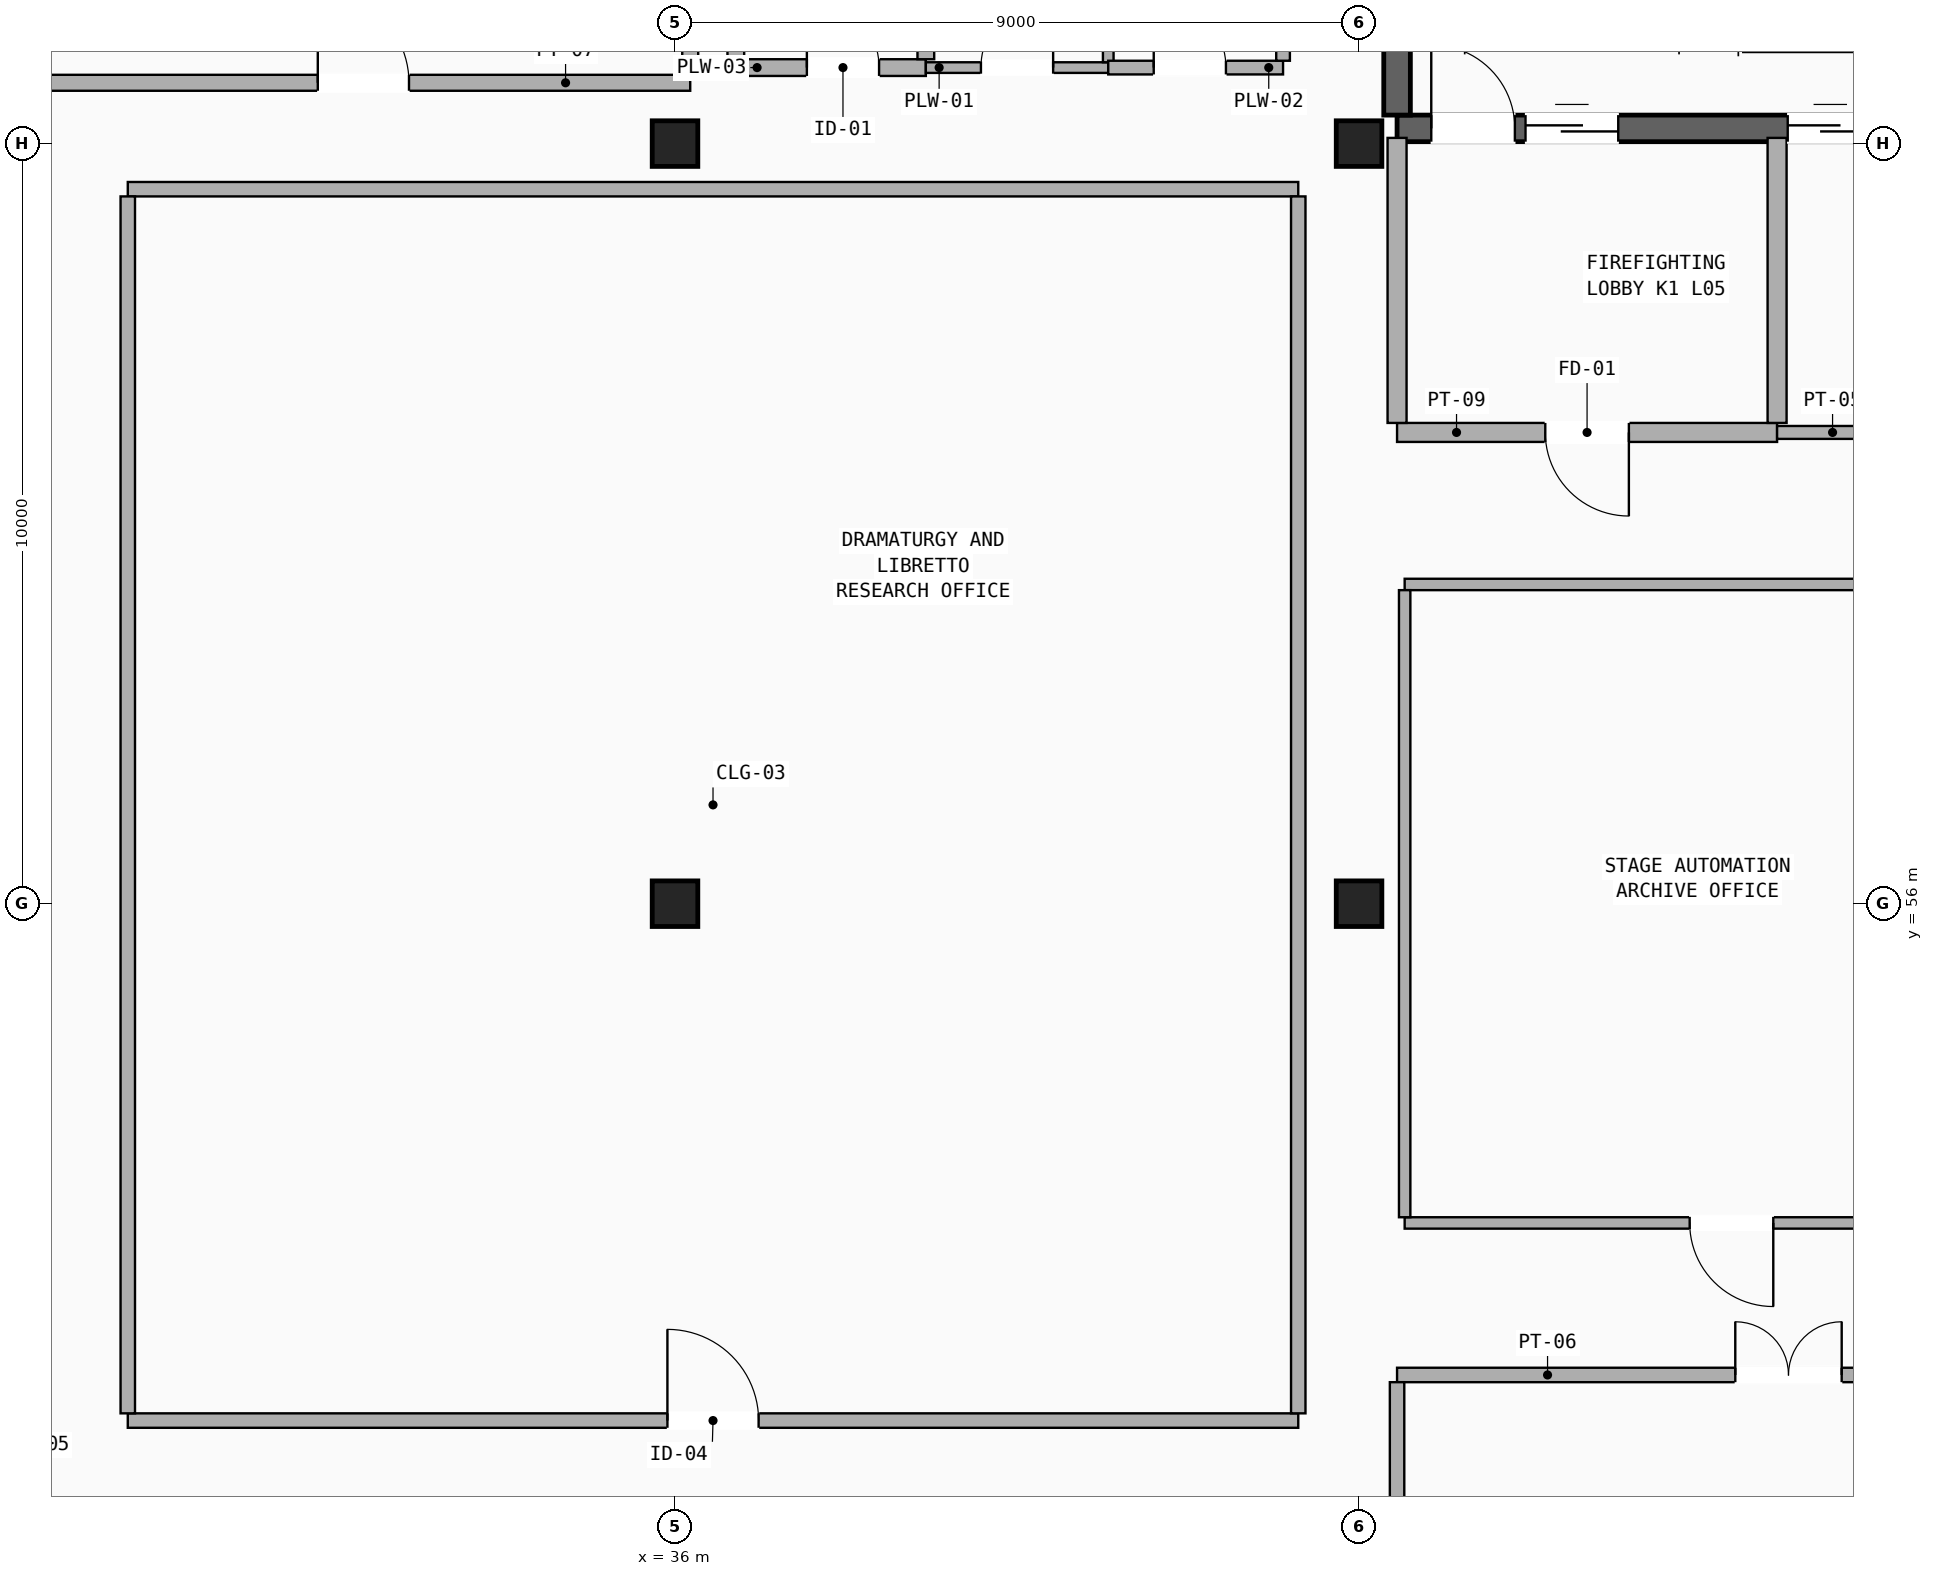
"""IFC4 building model, lengths in metres.
Left out: names, types, materials, properties, quantities, classifications, styles, units other than length and angle.
Written with IfcOpenShell. Run it as: python <this file> out.ifc"""

import sys

from ifc_helpers import new_model, si_unit, direction, frame, frame_2d, origin, origin_2d, place, context, subcontext, project, spatial, rectangle, extrude, element, fill, save


model = new_model("IFC4")
c1 = context("Model", 3, precision=1e-05, world=origin(), true_north=direction((0.0, 1.0)))
c2 = subcontext(c1, "Body", "Model", "MODEL_VIEW")
j1 = project(units=[si_unit("LENGTHUNIT", "METRE"), si_unit("PLANEANGLEUNIT", "RADIAN")], contexts=[c1])
p1 = place(None, origin())
s1 = spatial("IfcSite", under=j1, at=p1, CompositionType="ELEMENT")
p2 = place(p1, origin())
s2 = spatial("IfcBuilding", under=s1, at=p2, CompositionType="ELEMENT")
p3 = place(p2, frame((0.0, 0.0, 21.76)))
s3 = spatial("IfcBuildingStorey", under=s2, at=p3, CompositionType="ELEMENT", Elevation=21.76)
p4 = place(p3, frame((36.0, 56.0, 0.0), z_axis=(0.0, 0.0, 1.0), x_axis=(1.0, 0.0, 0.0)))
e1 = element("IfcColumn", 1, at=p4, inside=s3, PredefinedType="COLUMN", context=c2, shape_type="SweptSolid", body=[
    extrude(rectangle(XDim=0.6, YDim=0.6, at=origin_2d()), origin(), (0.0, 0.0, 1.0), 3.25),
])
p5 = place(p3, frame((36.0, 66.0, 0.0), z_axis=(0.0, 0.0, 1.0), x_axis=(1.0, 0.0, 0.0)))
e2 = element("IfcColumn", 2, at=p5, inside=s3, PredefinedType="COLUMN", context=c2, shape_type="SweptSolid", body=[
    extrude(rectangle(XDim=0.6, YDim=0.6, at=origin_2d()), origin(), (0.0, 0.0, 1.0), 7.987),
])
p6 = place(p3, frame((45.0, 56.0, 0.0), z_axis=(0.0, 0.0, 1.0), x_axis=(1.0, 0.0, 0.0)))
e3 = element("IfcColumn", 3, at=p6, inside=s3, PredefinedType="COLUMN", context=c2, shape_type="SweptSolid", body=[
    extrude(rectangle(XDim=0.6, YDim=0.6, at=origin_2d()), origin(), (0.0, 0.0, 1.0), 3.25),
])
p7 = place(p3, frame((45.0, 66.0, 0.0), z_axis=(0.0, 0.0, 1.0), x_axis=(1.0, 0.0, 0.0)))
e4 = element("IfcColumn", 4, at=p7, inside=s3, PredefinedType="COLUMN", context=c2, shape_type="SweptSolid", body=[
    extrude(rectangle(XDim=0.6, YDim=0.6, at=origin_2d()), origin(), (0.0, 0.0, 1.0), 7.987),
])
p8 = place(p3, frame((45.5, 66.2, 0.0), z_axis=(0.0, 0.0, 1.0), x_axis=(1.0, 0.0, 0.0)))
e5 = element("IfcWall", 5, at=p8, inside=s3, PredefinedType="SHEAR", context=c2, shape_type="SweptSolid", body=[
    extrude(rectangle(XDim=10.3, YDim=0.35, at=frame_2d((5.15, 0.0))), origin(), (0.0, 0.0, 1.0), 8.312),
])
p9 = place(p8, frame((0.45, 0.0, 0.0)))
e6 = element("IfcOpeningElement", 6, at=p9, cuts=e5, PredefinedType="OPENING", context=c2, shape_type="SweptSolid", body=[
    extrude(rectangle(XDim=1.1, YDim=2.2, at=frame_2d((0.55, 1.1))), frame((0.0, 0.185, 0.0), z_axis=(0.0, -1.0, 0.0), x_axis=(1.0, 0.0, 0.0)), (0.0, 0.0, 1.0), 0.37),
])
p10 = place(p8, frame((1.69, 0.0, 0.0)))
e7 = element("IfcOpeningElement", 7, at=p10, cuts=e5, PredefinedType="OPENING", context=c2, shape_type="SweptSolid", body=[
    extrude(rectangle(XDim=1.22, YDim=2.2, at=frame_2d((0.61, 1.1))), frame((0.0, 0.185, 0.0), z_axis=(0.0, -1.0, 0.0), x_axis=(1.0, 0.0, 0.0)), (0.0, 0.0, 1.0), 0.37),
])
p11 = place(p8, frame((5.14, 0.0, 0.0)))
e8 = element("IfcOpeningElement", 8, at=p11, cuts=e5, PredefinedType="OPENING", context=c2, shape_type="SweptSolid", body=[
    extrude(rectangle(XDim=1.12, YDim=2.16, at=frame_2d((0.56, 1.08))), frame((0.0, 0.185, 0.0), z_axis=(0.0, -1.0, 0.0), x_axis=(1.0, 0.0, 0.0)), (0.0, 0.0, 1.0), 0.37),
])
p12 = place(p3, frame((45.5, 66.375, 0.0), z_axis=(0.0, 0.0, 1.0), x_axis=(0.0, 1.0, 0.0)))
e9 = element("IfcWall", 9, at=p12, inside=s3, PredefinedType="SHEAR", context=c2, shape_type="SweptSolid", body=[
    extrude(rectangle(XDim=8.25, YDim=0.35, at=frame_2d((4.125, 0.0))), origin(), (0.0, 0.0, 1.0), 8.312),
])
p13 = place(p3, frame((45.5, 62.2, 0.0), z_axis=(0.0, 0.0, 1.0), x_axis=(1.0, 0.0, 0.0)))
e10 = element("IfcWall", 10, at=p13, inside=s3, PredefinedType="PARTITIONING", context=c2, shape_type="SweptSolid", body=[
    extrude(rectangle(XDim=5.0, YDim=0.25, at=frame_2d((2.5, 0.0))), origin(), (0.0, 0.0, 1.0), 6.247),
])
p14 = place(p13, frame((1.95, 0.0, 0.0)))
e11 = element("IfcOpeningElement", 11, at=p14, cuts=e10, PredefinedType="OPENING", context=c2, shape_type="SweptSolid", body=[
    extrude(rectangle(XDim=1.1, YDim=2.2, at=frame_2d((0.55, 1.1))), frame((0.0, 0.135, 0.0), z_axis=(0.0, -1.0, 0.0), x_axis=(1.0, 0.0, 0.0)), (0.0, 0.0, 1.0), 0.27),
])
for number, where, z_axis, x_axis in (
    (12, (45.5, 62.325, 0.0), (0.0, 0.0, 1.0), (0.0, 1.0, 0.0)),
    (13, (50.5, 62.325, 0.0), (0.0, 0.0, 1.0), (0.0, 1.0, 0.0)),
):
    element("IfcWall", number, at=place(p3, frame(where, z_axis=z_axis, x_axis=x_axis)), inside=s3, PredefinedType="PARTITIONING", context=c2, shape_type="SweptSolid", body=[
        extrude(rectangle(XDim=3.75, YDim=0.25, at=frame_2d((1.875, 0.0))), origin(), (0.0, 0.0, 1.0), 6.247),
    ])
p15 = place(p3, frame((50.5, 62.2, 0.0), z_axis=(0.0, 0.0, 1.0), x_axis=(1.0, 0.0, 0.0)))
e14 = element("IfcWall", 14, at=p15, inside=s3, PredefinedType="PARTITIONING", context=c2, shape_type="SweptSolid", body=[
    extrude(rectangle(XDim=5.3, YDim=0.17, at=frame_2d((2.65, 0.0))), origin(), (0.0, 0.0, 1.0), 2.989),
])
p16 = place(p15, frame((1.95, 0.0, 0.0)))
e15 = element("IfcOpeningElement", 15, at=p16, cuts=e14, PredefinedType="OPENING", context=c2, shape_type="SweptSolid", body=[
    extrude(rectangle(XDim=1.4, YDim=2.2, at=frame_2d((0.7, 1.1))), frame((0.0, 0.095, 0.0), z_axis=(0.0, -1.0, 0.0), x_axis=(1.0, 0.0, 0.0)), (0.0, 0.0, 1.0), 0.19),
])
p17 = place(p3, frame((45.5, 49.8, 0.0), z_axis=(0.0, 0.0, 1.0), x_axis=(1.0, 0.0, 0.0)))
e16 = element("IfcWall", 16, at=p17, inside=s3, PredefinedType="PARTITIONING", context=c2, shape_type="SweptSolid", body=[
    extrude(rectangle(XDim=10.3, YDim=0.19, at=frame_2d((5.15, 0.0))), origin(), (0.0, 0.0, 1.0), 2.989),
])
p18 = place(p17, frame((4.45, 0.0, 0.0)))
e17 = element("IfcOpeningElement", 17, at=p18, cuts=e16, PredefinedType="OPENING", context=c2, shape_type="SweptSolid", body=[
    extrude(rectangle(XDim=1.4, YDim=2.2, at=frame_2d((0.7, 1.1))), frame((0.0, 0.105, 0.0), z_axis=(0.0, -1.0, 0.0), x_axis=(1.0, 0.0, 0.0)), (0.0, 0.0, 1.0), 0.21),
])
p19 = place(p3, frame((45.5, 45.895, 0.0), z_axis=(0.0, 0.0, 1.0), x_axis=(0.0, 1.0, 0.0)))
e18 = element("IfcWall", 18, at=p19, inside=s3, PredefinedType="PARTITIONING", context=c2, shape_type="SweptSolid", body=[
    extrude(rectangle(XDim=3.81, YDim=0.19, at=frame_2d((1.905, 0.0))), origin(), (0.0, 0.0, 1.0), 6.247),
])
p20 = place(p3, frame((36.8, 67.0, 0.0), z_axis=(0.0, 0.0, 1.0), x_axis=(1.0, 0.0, 0.0)))
e19 = element("IfcWall", 19, at=p20, inside=s3, PredefinedType="PLUMBINGWALL", context=c2, shape_type="SweptSolid", body=[
    extrude(rectangle(XDim=2.5, YDim=0.22, at=frame_2d((1.25, 0.0))), origin(), (0.0, 0.0, 1.0), 8.521),
])
p21 = place(p20, frame((0.935, 0.0, 0.0)))
e20 = element("IfcOpeningElement", 20, at=p21, cuts=e19, PredefinedType="OPENING", context=c2, shape_type="SweptSolid", body=[
    extrude(rectangle(XDim=0.95, YDim=2.15, at=frame_2d((0.475, 1.075))), frame((0.0, 0.12, 0.0), z_axis=(0.0, -1.0, 0.0), x_axis=(1.0, 0.0, 0.0)), (0.0, 0.0, 1.0), 0.24),
])
for number, where, z_axis, x_axis in (
    (21, (36.8, 67.11, 0.0), (0.0, 0.0, 1.0), (0.0, 1.0, 0.0)),
    (22, (39.3, 67.11, 0.0), (0.0, 0.0, 1.0), (0.0, 1.0, 0.0)),
):
    element("IfcWall", number, at=place(p3, frame(where, z_axis=z_axis, x_axis=x_axis)), inside=s3, PredefinedType="PLUMBINGWALL", context=c2, shape_type="SweptSolid", body=[
        extrude(rectangle(XDim=2.58, YDim=0.22, at=frame_2d((1.29, 0.0))), origin(), (0.0, 0.0, 1.0), 8.521),
    ])
p22 = place(p3, frame((39.3, 67.0, 0.0), z_axis=(0.0, 0.0, 1.0), x_axis=(1.0, 0.0, 0.0)))
e23 = element("IfcWall", 23, at=p22, inside=s3, PredefinedType="PLUMBINGWALL", context=c2, shape_type="SweptSolid", body=[
    extrude(rectangle(XDim=2.4, YDim=0.14, at=frame_2d((1.2, 0.0))), origin(), (0.0, 0.0, 1.0), 8.521),
])
p23 = place(p22, frame((0.725, 0.0, 0.0)))
e24 = element("IfcOpeningElement", 24, at=p23, cuts=e23, PredefinedType="OPENING", context=c2, shape_type="SweptSolid", body=[
    extrude(rectangle(XDim=0.95, YDim=2.15, at=frame_2d((0.475, 1.075))), frame((0.0, 0.08, 0.0), z_axis=(0.0, -1.0, 0.0), x_axis=(1.0, 0.0, 0.0)), (0.0, 0.0, 1.0), 0.16),
])
p24 = place(p3, frame((41.7, 67.07, 0.0), z_axis=(0.0, 0.0, 1.0), x_axis=(0.0, 1.0, 0.0)))
e25 = element("IfcWall", 25, at=p24, inside=s3, PredefinedType="PLUMBINGWALL", context=c2, shape_type="SweptSolid", body=[
    extrude(rectangle(XDim=2.66, YDim=0.14, at=frame_2d((1.33, 0.0))), origin(), (0.0, 0.0, 1.0), 8.521),
])
p25 = place(p3, frame((41.7, 67.0, 0.0), z_axis=(0.0, 0.0, 1.0), x_axis=(1.0, 0.0, 0.0)))
e26 = element("IfcWall", 26, at=p25, inside=s3, PredefinedType="PLUMBINGWALL", context=c2, shape_type="SweptSolid", body=[
    extrude(rectangle(XDim=2.3, YDim=0.18, at=frame_2d((1.15, 0.0))), origin(), (0.0, 0.0, 1.0), 8.521),
])
p26 = place(p25, frame((0.598, 0.0, 0.0)))
e27 = element("IfcOpeningElement", 27, at=p26, cuts=e26, PredefinedType="OPENING", context=c2, shape_type="SweptSolid", body=[
    extrude(rectangle(XDim=0.95, YDim=2.15, at=frame_2d((0.475, 1.075))), frame((0.0, 0.1, 0.0), z_axis=(0.0, -1.0, 0.0), x_axis=(1.0, 0.0, 0.0)), (0.0, 0.0, 1.0), 0.2),
])
p27 = place(p3, frame((44.0, 67.09, 0.0), z_axis=(0.0, 0.0, 1.0), x_axis=(0.0, 1.0, 0.0)))
e28 = element("IfcWall", 28, at=p27, inside=s3, PredefinedType="PLUMBINGWALL", context=c2, shape_type="SweptSolid", body=[
    extrude(rectangle(XDim=2.62, YDim=0.18, at=frame_2d((1.31, 0.0))), origin(), (0.0, 0.0, 1.0), 8.521),
])
p28 = place(p3, frame((28.8, 49.2, 0.0), z_axis=(0.0, 0.0, 1.0), x_axis=(1.0, 0.0, 0.0)))
e29 = element("IfcWall", 29, at=p28, inside=s3, PredefinedType="PARTITIONING", context=c2, shape_type="SweptSolid", body=[
    extrude(rectangle(XDim=15.4, YDim=0.19, at=frame_2d((7.7, 0.0))), origin(), (0.0, 0.0, 1.0), 2.989),
])
p29 = place(p28, frame((7.1, 0.0, 0.0)))
e30 = element("IfcOpeningElement", 30, at=p29, cuts=e29, PredefinedType="OPENING", context=c2, shape_type="SweptSolid", body=[
    extrude(rectangle(XDim=1.2, YDim=2.2, at=frame_2d((0.6, 1.1))), frame((0.0, 0.105, 0.0), z_axis=(0.0, -1.0, 0.0), x_axis=(1.0, 0.0, 0.0)), (0.0, 0.0, 1.0), 0.21),
])
p30 = place(p3, frame((28.8, 65.4, 0.0), z_axis=(0.0, 0.0, 1.0), x_axis=(1.0, 0.0, 0.0)))
e31 = element("IfcWall", 31, at=p30, inside=s3, PredefinedType="PARTITIONING", context=c2, shape_type="SweptSolid", body=[
    extrude(rectangle(XDim=15.4, YDim=0.19, at=frame_2d((7.7, 0.0))), origin(), (0.0, 0.0, 1.0), 2.989),
])
for number, where, z_axis, x_axis in (
    (32, (28.8, 49.295, 0.0), (0.0, 0.0, 1.0), (0.0, 1.0, 0.0)),
    (33, (44.2, 49.295, 0.0), (0.0, 0.0, 1.0), (0.0, 1.0, 0.0)),
):
    element("IfcWall", number, at=place(p3, frame(where, z_axis=z_axis, x_axis=x_axis)), inside=s3, PredefinedType="PARTITIONING", context=c2, shape_type="SweptSolid", body=[
        extrude(rectangle(XDim=16.01, YDim=0.19, at=frame_2d((8.005, 0.0))), origin(), (0.0, 0.0, 1.0), 6.531),
    ])
p31 = place(p3, frame((27.6, 66.8, 0.0), z_axis=(0.0, 0.0, 1.0), x_axis=(1.0, 0.0, 0.0)))
e34 = element("IfcWall", 34, at=p31, inside=s3, PredefinedType="PARTITIONING", context=c2, shape_type="SweptSolid", body=[
    extrude(rectangle(XDim=8.6, YDim=0.21, at=frame_2d((4.3, 0.0))), origin(), (0.0, 0.0, 1.0), 2.989),
])
p32 = place(p31, frame((3.7, 0.0, 0.0)))
e35 = element("IfcOpeningElement", 35, at=p32, cuts=e34, PredefinedType="OPENING", context=c2, shape_type="SweptSolid", body=[
    extrude(rectangle(XDim=1.2, YDim=2.2, at=frame_2d((0.6, 1.1))), frame((0.0, 0.115, 0.0), z_axis=(0.0, -1.0, 0.0), x_axis=(1.0, 0.0, 0.0)), (0.0, 0.0, 1.0), 0.23),
])
p33 = place(p3, frame((36.2, 66.905, 0.0), z_axis=(0.0, 0.0, 1.0), x_axis=(0.0, 1.0, 0.0)))
e36 = element("IfcWall", 36, at=p33, inside=s3, PredefinedType="PARTITIONING", context=c2, shape_type="SweptSolid", body=[
    extrude(rectangle(XDim=7.19, YDim=0.21, at=frame_2d((3.595, 0.0))), origin(), (0.0, 0.0, 1.0), 2.989),
])
p34 = place(p3, frame((45.6, 51.8, 0.0), z_axis=(0.0, 0.0, 1.0), x_axis=(1.0, 0.0, 0.0)))
e37 = element("IfcWall", 37, at=p34, inside=s3, PredefinedType="PARTITIONING", context=c2, shape_type="SweptSolid", body=[
    extrude(rectangle(XDim=8.6, YDim=0.15, at=frame_2d((4.3, 0.0))), origin(), (0.0, 0.0, 1.0), 2.611),
])
p35 = place(p34, frame((3.75, 0.0, 0.0)))
e38 = element("IfcOpeningElement", 38, at=p35, cuts=e37, PredefinedType="OPENING", context=c2, shape_type="SweptSolid", body=[
    extrude(rectangle(XDim=1.1, YDim=2.2, at=frame_2d((0.55, 1.1))), frame((0.0, 0.085, 0.0), z_axis=(0.0, -1.0, 0.0), x_axis=(1.0, 0.0, 0.0)), (0.0, 0.0, 1.0), 0.17),
])
p36 = place(p3, frame((45.6, 60.2, 0.0), z_axis=(0.0, 0.0, 1.0), x_axis=(1.0, 0.0, 0.0)))
e39 = element("IfcWall", 39, at=p36, inside=s3, PredefinedType="PARTITIONING", context=c2, shape_type="SweptSolid", body=[
    extrude(rectangle(XDim=8.6, YDim=0.15, at=frame_2d((4.3, 0.0))), origin(), (0.0, 0.0, 1.0), 2.611),
])
p37 = place(p3, frame((45.6, 51.875, 0.0), z_axis=(0.0, 0.0, 1.0), x_axis=(0.0, 1.0, 0.0)))
e40 = element("IfcWall", 40, at=p37, inside=s3, PredefinedType="PARTITIONING", context=c2, shape_type="SweptSolid", body=[
    extrude(rectangle(XDim=8.25, YDim=0.15, at=frame_2d((4.125, 0.0))), origin(), (0.0, 0.0, 1.0), 5.3),
])
p38 = place(p9, origin())
e41 = element("IfcDoor", 41, at=p38, inside=s3, OperationType="SINGLE_SWING_LEFT", PredefinedType="DOOR", context=c2, shape_type="SweptSolid", body=[
    extrude(rectangle(XDim=1.1, YDim=2.2, at=frame_2d((0.55, 1.1))), frame((0.0, 0.025, 0.0), z_axis=(0.0, -1.0, 0.0), x_axis=(1.0, 0.0, 0.0)), (0.0, 0.0, 1.0), 0.05),
])
fill(e6, e41)
p39 = place(p10, origin())
e42 = element("IfcDoor", 42, at=p39, inside=s3, OperationType="SLIDING_TO_LEFT", PredefinedType="DOOR", context=c2, shape_type="SweptSolid", body=[
    extrude(rectangle(XDim=1.22, YDim=2.2, at=frame_2d((0.61, 1.1))), frame((0.0, 0.025, 0.0), z_axis=(0.0, -1.0, 0.0), x_axis=(1.0, 0.0, 0.0)), (0.0, 0.0, 1.0), 0.05),
])
fill(e7, e42)
p40 = place(p11, origin())
e43 = element("IfcDoor", 43, at=p40, inside=s3, OperationType="SLIDING_TO_LEFT", PredefinedType="DOOR", context=c2, shape_type="SweptSolid", body=[
    extrude(rectangle(XDim=1.12, YDim=2.16, at=frame_2d((0.56, 1.08))), frame((0.0, 0.025, 0.0), z_axis=(0.0, -1.0, 0.0), x_axis=(1.0, 0.0, 0.0)), (0.0, 0.0, 1.0), 0.05),
])
fill(e8, e43)
p41 = place(p14, frame((1.1, 0.0, 0.0), z_axis=(0.0, 0.0, 1.0), x_axis=(-1.0, 0.0, 0.0)))
e44 = element("IfcDoor", 44, at=p41, inside=s3, OperationType="SINGLE_SWING_LEFT", PredefinedType="DOOR", context=c2, shape_type="SweptSolid", body=[
    extrude(rectangle(XDim=1.1, YDim=2.2, at=frame_2d((0.55, 1.1))), frame((0.0, 0.025, 0.0), z_axis=(0.0, -1.0, 0.0), x_axis=(1.0, 0.0, 0.0)), (0.0, 0.0, 1.0), 0.05),
])
fill(e11, e44)
p42 = place(p18, origin())
e45 = element("IfcDoor", 45, at=p42, inside=s3, OperationType="DOUBLE_DOOR_SINGLE_SWING", PredefinedType="DOOR", context=c2, shape_type="SweptSolid", body=[
    extrude(rectangle(XDim=1.4, YDim=2.2, at=frame_2d((0.7, 1.1))), frame((0.0, 0.025, 0.0), z_axis=(0.0, -1.0, 0.0), x_axis=(1.0, 0.0, 0.0)), (0.0, 0.0, 1.0), 0.05),
])
fill(e17, e45)
p43 = place(p21, origin())
e46 = element("IfcDoor", 46, at=p43, inside=s3, OperationType="SINGLE_SWING_LEFT", PredefinedType="DOOR", context=c2, shape_type="SweptSolid", body=[
    extrude(rectangle(XDim=0.95, YDim=2.15, at=frame_2d((0.475, 1.075))), frame((0.0, 0.025, 0.0), z_axis=(0.0, -1.0, 0.0), x_axis=(1.0, 0.0, 0.0)), (0.0, 0.0, 1.0), 0.05),
])
fill(e20, e46)
p44 = place(p23, origin())
e47 = element("IfcDoor", 47, at=p44, inside=s3, OperationType="SINGLE_SWING_RIGHT", PredefinedType="DOOR", context=c2, shape_type="SweptSolid", body=[
    extrude(rectangle(XDim=0.95, YDim=2.15, at=frame_2d((0.475, 1.075))), frame((0.0, 0.025, 0.0), z_axis=(0.0, -1.0, 0.0), x_axis=(1.0, 0.0, 0.0)), (0.0, 0.0, 1.0), 0.05),
])
fill(e24, e47)
p45 = place(p26, origin())
e48 = element("IfcDoor", 48, at=p45, inside=s3, OperationType="SINGLE_SWING_LEFT", PredefinedType="DOOR", context=c2, shape_type="SweptSolid", body=[
    extrude(rectangle(XDim=0.95, YDim=2.15, at=frame_2d((0.475, 1.075))), frame((0.0, 0.025, 0.0), z_axis=(0.0, -1.0, 0.0), x_axis=(1.0, 0.0, 0.0)), (0.0, 0.0, 1.0), 0.05),
])
fill(e27, e48)
p46 = place(p29, origin())
e49 = element("IfcDoor", 49, at=p46, inside=s3, OperationType="SINGLE_SWING_LEFT", PredefinedType="DOOR", context=c2, shape_type="SweptSolid", body=[
    extrude(rectangle(XDim=1.2, YDim=2.2, at=frame_2d((0.6, 1.1))), frame((0.0, 0.025, 0.0), z_axis=(0.0, -1.0, 0.0), x_axis=(1.0, 0.0, 0.0)), (0.0, 0.0, 1.0), 0.05),
])
fill(e30, e49)
p47 = place(p32, origin())
e50 = element("IfcDoor", 50, at=p47, inside=s3, OperationType="SINGLE_SWING_LEFT", PredefinedType="DOOR", context=c2, shape_type="SweptSolid", body=[
    extrude(rectangle(XDim=1.2, YDim=2.2, at=frame_2d((0.6, 1.1))), frame((0.0, 0.025, 0.0), z_axis=(0.0, -1.0, 0.0), x_axis=(1.0, 0.0, 0.0)), (0.0, 0.0, 1.0), 0.05),
])
fill(e35, e50)
p48 = place(p35, frame((1.1, 0.0, 0.0), z_axis=(0.0, 0.0, 1.0), x_axis=(-1.0, 0.0, 0.0)))
e51 = element("IfcDoor", 51, at=p48, inside=s3, OperationType="SINGLE_SWING_LEFT", PredefinedType="DOOR", context=c2, shape_type="SweptSolid", body=[
    extrude(rectangle(XDim=1.1, YDim=2.2, at=frame_2d((0.55, 1.1))), frame((0.0, 0.025, 0.0), z_axis=(0.0, -1.0, 0.0), x_axis=(1.0, 0.0, 0.0)), (0.0, 0.0, 1.0), 0.05),
])
fill(e38, e51)
save(model, sys.argv[1])
